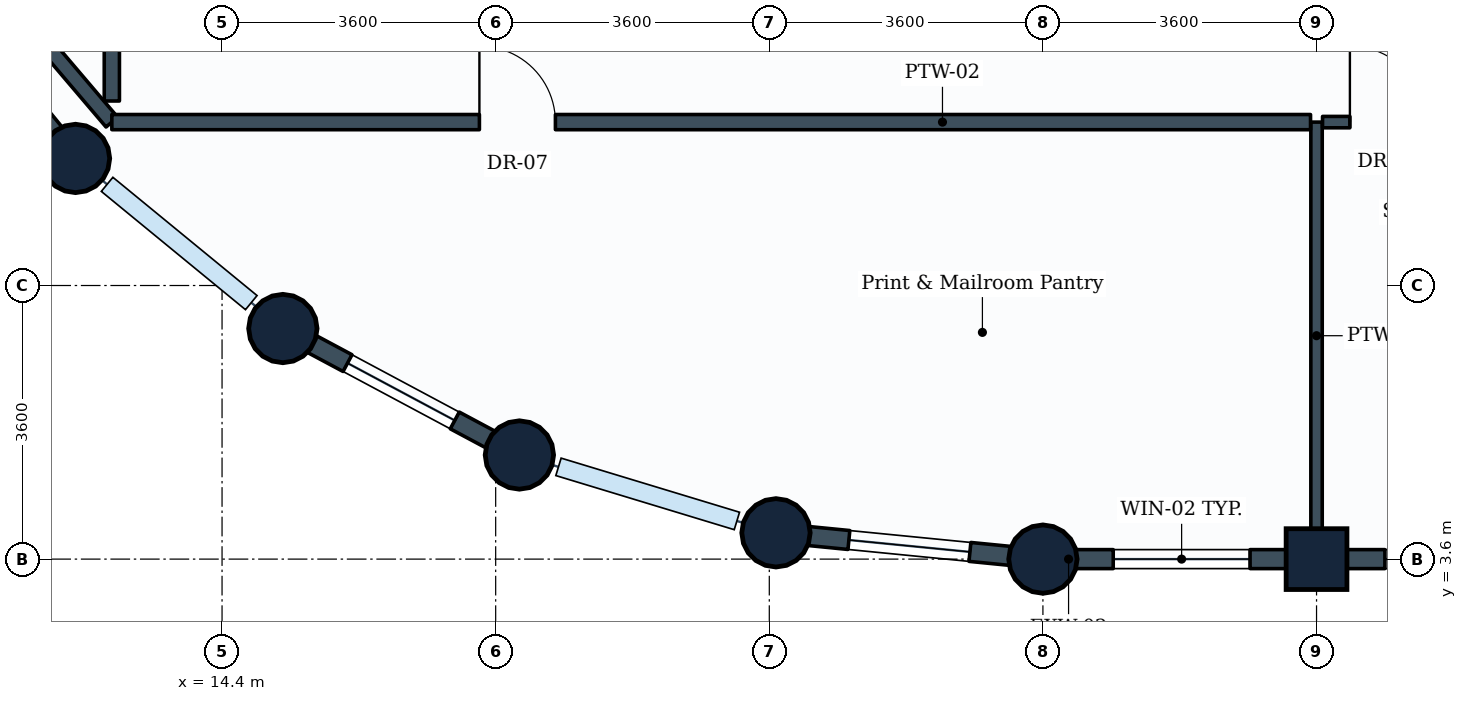
"""IFC4 building model, lengths in metres.
Left out: names, types, materials, properties, quantities, classifications, styles, units other than length and angle.
Written with IfcOpenShell. Run it as: python <this file> out.ifc"""

import sys

from ifc_helpers import new_model, si_unit, direction, frame, frame_2d, origin, origin_2d, place, context, subcontext, project, spatial, rectangle, circle, extrude, element, fill, save


model = new_model("IFC4")
c1 = context("Model", 3, precision=1e-05, world=origin(), true_north=direction((0.0, 1.0)))
c2 = subcontext(c1, "Body", "Model", "MODEL_VIEW")
j1 = project(units=[si_unit("LENGTHUNIT", "METRE"), si_unit("PLANEANGLEUNIT", "RADIAN")], contexts=[c1])
p1 = place(None, origin())
s1 = spatial("IfcSite", under=j1, at=p1, CompositionType="ELEMENT")
p2 = place(p1, origin())
s2 = spatial("IfcBuilding", under=s1, at=p2, CompositionType="ELEMENT")
p3 = place(p2, frame((0.0, 0.0, 273.8)))
s3 = spatial("IfcBuildingStorey", under=s2, at=p3, CompositionType="ELEMENT", Elevation=273.8)
for number, where, z_axis, x_axis in (
    (1, (12.472, 8.872, 0.0), (0.0, 0.0, 1.0), (1.0, 0.0, 0.0)),
    (2, (15.2, 6.634, 0.0), (0.0, 0.0, 1.0), (1.0, 0.0, 0.0)),
    (3, (18.312, 4.97, 0.0), (0.0, 0.0, 1.0), (1.0, 0.0, 0.0)),
    (4, (21.688, 3.946, 0.0), (0.0, 0.0, 1.0), (1.0, 0.0, 0.0)),
    (5, (25.2, 3.6, 0.0), (0.0, 0.0, 1.0), (1.0, 0.0, 0.0)),
):
    element("IfcColumn", number, at=place(p3, frame(where, z_axis=z_axis, x_axis=x_axis)), inside=s3, PredefinedType="COLUMN", context=c2, shape_type="SweptSolid", body=[
        extrude(circle(Radius=0.45, at=origin_2d()), origin(), (0.0, 0.0, 1.0), 3.6),
    ])
p4 = place(p3, frame((28.8, 3.6, 0.0), z_axis=(0.0, 0.0, 1.0), x_axis=(1.0, 0.0, 0.0)))
e6 = element("IfcColumn", 6, at=p4, inside=s3, PredefinedType="COLUMN", context=c2, shape_type="SweptSolid", body=[
    extrude(rectangle(XDim=0.8, YDim=0.8, at=origin_2d()), origin(), (0.0, 0.0, 1.0), 3.6),
])
p5 = place(p3, frame((28.8, 3.6, 0.0), z_axis=(0.0, 0.0, 1.0), x_axis=(-1.0, 0.0, 0.0)))
e7 = element("IfcWall", 7, at=p5, inside=s3, PredefinedType="STANDARD", context=c2, shape_type="SweptSolid", body=[
    extrude(rectangle(XDim=3.6, YDim=0.25, at=frame_2d((1.8, 0.0))), origin(), (0.0, 0.0, 1.0), 2.83),
])
p6 = place(p5, frame((0.875, 0.0, 0.85)))
e8 = element("IfcOpeningElement", 8, at=p6, cuts=e7, PredefinedType="OPENING", context=c2, shape_type="SweptSolid", body=[
    extrude(rectangle(XDim=1.8, YDim=1.35, at=frame_2d((0.9, 0.675))), frame((0.0, 0.135, 0.0), z_axis=(0.0, -1.0, 0.0), x_axis=(1.0, 0.0, 0.0)), (0.0, 0.0, 1.0), 0.27),
])
p7 = place(p3, frame((32.4, 3.6, 0.0), z_axis=(0.0, 0.0, 1.0), x_axis=(-1.0, 0.0, 0.0)))
e9 = element("IfcWall", 9, at=p7, inside=s3, PredefinedType="STANDARD", context=c2, shape_type="SweptSolid", body=[
    extrude(rectangle(XDim=3.6, YDim=0.25, at=frame_2d((1.8, 0.0))), origin(), (0.0, 0.0, 1.0), 2.83),
])
p8 = place(p7, frame((0.9, 0.0, 0.85)))
e10 = element("IfcOpeningElement", 10, at=p8, cuts=e9, PredefinedType="OPENING", context=c2, shape_type="SweptSolid", body=[
    extrude(rectangle(XDim=1.8, YDim=1.35, at=frame_2d((0.9, 0.675))), frame((0.0, 0.135, 0.0), z_axis=(0.0, -1.0, 0.0), x_axis=(1.0, 0.0, 0.0)), (0.0, 0.0, 1.0), 0.27),
])
p9 = place(p3, frame((12.472, 8.872, 0.0), z_axis=(0.0, 0.0, 1.0), x_axis=(-0.634258295121, 0.773121216285, 0.0)))
e11 = element("IfcWall", 11, at=p9, inside=s3, PredefinedType="STANDARD", context=c2, shape_type="SweptSolid", body=[
    extrude(rectangle(XDim=3.529, YDim=0.25, at=frame_2d((1.764, 0.0))), origin(), (0.0, 0.0, 1.0), 2.83),
])
p10 = place(p9, frame((0.964, 0.0, 0.85)))
e12 = element("IfcOpeningElement", 12, at=p10, cuts=e11, PredefinedType="OPENING", context=c2, shape_type="SweptSolid", body=[
    extrude(rectangle(XDim=1.6, YDim=1.35, at=frame_2d((0.8, 0.675))), frame((0.0, 0.135, 0.0), z_axis=(0.0, -1.0, 0.0), x_axis=(1.0, 0.0, 0.0)), (0.0, 0.0, 1.0), 0.27),
])
p11 = place(p3, frame((18.312, 4.97, 0.0), z_axis=(0.0, 0.0, 1.0), x_axis=(-0.881846862014, 0.471535907389, 0.0)))
e13 = element("IfcWall", 13, at=p11, inside=s3, PredefinedType="STANDARD", context=c2, shape_type="SweptSolid", body=[
    extrude(rectangle(XDim=3.529, YDim=0.25, at=frame_2d((1.765, 0.0))), origin(), (0.0, 0.0, 1.0), 2.83),
])
p12 = place(p11, frame((0.964, 0.0, 0.85)))
e14 = element("IfcOpeningElement", 14, at=p12, cuts=e13, PredefinedType="OPENING", context=c2, shape_type="SweptSolid", body=[
    extrude(rectangle(XDim=1.6, YDim=1.35, at=frame_2d((0.8, 0.675))), frame((0.0, 0.135, 0.0), z_axis=(0.0, -1.0, 0.0), x_axis=(1.0, 0.0, 0.0)), (0.0, 0.0, 1.0), 0.27),
])
p13 = place(p3, frame((25.2, 3.6, 0.0), z_axis=(0.0, 0.0, 1.0), x_axis=(-0.995183369056, 0.098030923459, 0.0)))
e15 = element("IfcWall", 15, at=p13, inside=s3, PredefinedType="STANDARD", context=c2, shape_type="SweptSolid", body=[
    extrude(rectangle(XDim=3.529, YDim=0.25, at=frame_2d((1.765, 0.0))), origin(), (0.0, 0.0, 1.0), 2.83),
])
p14 = place(p13, frame((0.965, 0.0, 0.85)))
e16 = element("IfcOpeningElement", 16, at=p14, cuts=e15, PredefinedType="OPENING", context=c2, shape_type="SweptSolid", body=[
    extrude(rectangle(XDim=1.6, YDim=1.35, at=frame_2d((0.8, 0.675))), frame((0.0, 0.135, 0.0), z_axis=(0.0, -1.0, 0.0), x_axis=(1.0, 0.0, 0.0)), (0.0, 0.0, 1.0), 0.27),
])
p15 = place(p3, frame((28.8, 9.35, 0.0), z_axis=(0.0, 0.0, 1.0), x_axis=(0.0, -1.0, 0.0)))
e17 = element("IfcWall", 17, at=p15, inside=s3, PredefinedType="PARTITIONING", context=c2, shape_type="SweptSolid", body=[
    extrude(rectangle(XDim=5.621, YDim=0.15, at=frame_2d((2.811, 0.0))), origin(), (0.0, 0.0, 1.0), 3.335),
])
p16 = place(p3, frame((12.95, 9.35, 0.0), z_axis=(0.0, 0.0, 1.0), x_axis=(-0.648005936971, 0.76163528388, 0.0)))
e18 = element("IfcWall", 18, at=p16, inside=s3, PredefinedType="PARTITIONING", context=c2, shape_type="SweptSolid", body=[
    extrude(rectangle(XDim=6.282, YDim=0.2, at=frame_2d((3.141, 0.0))), origin(), (0.0, 0.0, 1.0), 2.83),
])
p17 = place(p3, frame((12.95, 9.628, 0.0), z_axis=(0.0, 0.0, 1.0), x_axis=(0.0, 1.0, 0.0)))
e19 = element("IfcWall", 19, at=p17, inside=s3, PredefinedType="PARTITIONING", context=c2, shape_type="SweptSolid", body=[
    extrude(rectangle(XDim=6.868, YDim=0.2, at=frame_2d((3.434, 0.0))), origin(), (0.0, 0.0, 1.0), 3.03),
])
p18 = place(p17, frame((3.953, 0.0, 0.0)))
e20 = element("IfcOpeningElement", 20, at=p18, cuts=e19, PredefinedType="OPENING", context=c2, shape_type="SweptSolid", body=[
    extrude(rectangle(XDim=1.0, YDim=2.1, at=frame_2d((0.5, 1.05))), frame((0.0, 0.11, 0.0), z_axis=(0.0, -1.0, 0.0), x_axis=(1.0, 0.0, 0.0)), (0.0, 0.0, 1.0), 0.22),
])
p19 = place(p3, frame((12.95, 9.35, 0.0), z_axis=(0.0, 0.0, 1.0), x_axis=(1.0, 0.0, 0.0)))
e21 = element("IfcWall", 21, at=p19, inside=s3, PredefinedType="PARTITIONING", context=c2, shape_type="SweptSolid", body=[
    extrude(rectangle(XDim=15.771, YDim=0.2, at=frame_2d((7.885, 0.0))), origin(), (0.0, 0.0, 1.0), 3.02),
])
p20 = place(p19, frame((4.836, 0.0, 0.0)))
e22 = element("IfcOpeningElement", 22, at=p20, cuts=e21, PredefinedType="OPENING", context=c2, shape_type="SweptSolid", body=[
    extrude(rectangle(XDim=1.0, YDim=2.1, at=frame_2d((0.5, 1.05))), frame((0.0, 0.11, 0.0), z_axis=(0.0, -1.0, 0.0), x_axis=(1.0, 0.0, 0.0)), (0.0, 0.0, 1.0), 0.22),
])
p21 = place(p3, frame((28.879, 9.35, 0.0), z_axis=(0.0, 0.0, 1.0), x_axis=(1.0, 0.0, 0.0)))
e23 = element("IfcWall", 23, at=p21, inside=s3, PredefinedType="PARTITIONING", context=c2, shape_type="SweptSolid", body=[
    extrude(rectangle(XDim=5.521, YDim=0.15, at=frame_2d((2.76, 0.0))), origin(), (0.0, 0.0, 1.0), 3.335),
])
p22 = place(p21, frame((0.36, 0.0, 0.0)))
e24 = element("IfcOpeningElement", 24, at=p22, cuts=e23, PredefinedType="OPENING", context=c2, shape_type="SweptSolid", body=[
    extrude(rectangle(XDim=1.0, YDim=2.1, at=frame_2d((0.5, 1.05))), frame((0.0, 0.085, 0.0), z_axis=(0.0, -1.0, 0.0), x_axis=(1.0, 0.0, 0.0)), (0.0, 0.0, 1.0), 0.17),
])
p23 = place(p6, origin())
e25 = element("IfcWindow", 25, at=p23, inside=s3, PartitioningType="SINGLE_PANEL", PredefinedType="WINDOW", context=c2, shape_type="SweptSolid", body=[
    extrude(rectangle(XDim=1.8, YDim=1.35, at=frame_2d((0.9, 0.675))), frame((0.0, 0.03, 0.0), z_axis=(0.0, -1.0, 0.0), x_axis=(1.0, 0.0, 0.0)), (0.0, 0.0, 1.0), 0.06),
])
fill(e8, e25)
p24 = place(p8, origin())
e26 = element("IfcWindow", 26, at=p24, inside=s3, PartitioningType="SINGLE_PANEL", PredefinedType="WINDOW", context=c2, shape_type="SweptSolid", body=[
    extrude(rectangle(XDim=1.8, YDim=1.35, at=frame_2d((0.9, 0.675))), frame((0.0, 0.03, 0.0), z_axis=(0.0, -1.0, 0.0), x_axis=(1.0, 0.0, 0.0)), (0.0, 0.0, 1.0), 0.06),
])
fill(e10, e26)
p25 = place(p12, origin())
e27 = element("IfcWindow", 27, at=p25, inside=s3, PartitioningType="SINGLE_PANEL", PredefinedType="WINDOW", context=c2, shape_type="SweptSolid", body=[
    extrude(rectangle(XDim=1.6, YDim=1.35, at=frame_2d((0.8, 0.675))), frame((0.0, 0.03, 0.0), z_axis=(0.0, -1.0, 0.0), x_axis=(1.0, 0.0, 0.0)), (0.0, 0.0, 1.0), 0.06),
])
fill(e14, e27)
p26 = place(p14, origin())
e28 = element("IfcWindow", 28, at=p26, inside=s3, PartitioningType="SINGLE_PANEL", PredefinedType="WINDOW", context=c2, shape_type="SweptSolid", body=[
    extrude(rectangle(XDim=1.6, YDim=1.35, at=frame_2d((0.8, 0.675))), frame((0.0, 0.03, 0.0), z_axis=(0.0, -1.0, 0.0), x_axis=(1.0, 0.0, 0.0)), (0.0, 0.0, 1.0), 0.06),
])
fill(e16, e28)
p27 = place(p20, origin())
e29 = element("IfcDoor", 29, at=p27, inside=s3, OperationType="SINGLE_SWING_LEFT", PredefinedType="DOOR", context=c2, shape_type="SweptSolid", body=[
    extrude(rectangle(XDim=1.0, YDim=2.1, at=frame_2d((0.5, 1.05))), frame((0.0, 0.025, 0.0), z_axis=(0.0, -1.0, 0.0), x_axis=(1.0, 0.0, 0.0)), (0.0, 0.0, 1.0), 0.05),
])
fill(e22, e29)
p28 = place(p22, origin())
e30 = element("IfcDoor", 30, at=p28, inside=s3, OperationType="SINGLE_SWING_LEFT", PredefinedType="DOOR", context=c2, shape_type="SweptSolid", body=[
    extrude(rectangle(XDim=1.0, YDim=2.1, at=frame_2d((0.5, 1.05))), frame((0.0, 0.025, 0.0), z_axis=(0.0, -1.0, 0.0), x_axis=(1.0, 0.0, 0.0)), (0.0, 0.0, 1.0), 0.05),
])
fill(e24, e30)
save(model, sys.argv[1])
